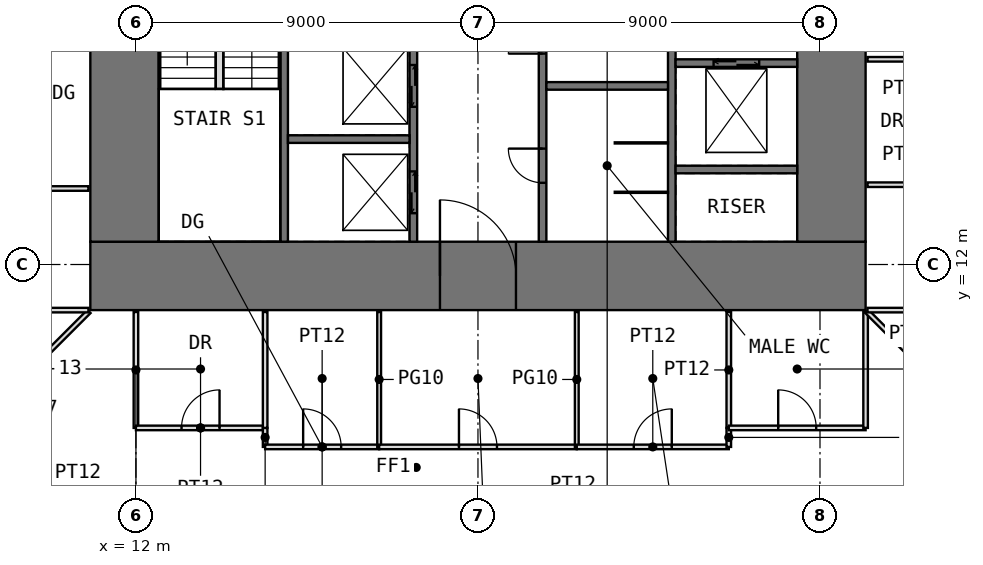
"""IFC4 building model, lengths in metres.
Left out: names, types, materials, properties, quantities, classifications, styles, units other than length and angle.
Written with IfcOpenShell. Run it as: python <this file> out.ifc"""

import sys

from ifc_helpers import new_model, si_unit, direction, frame, frame_2d, origin, place, context, subcontext, project, spatial, rectangle, extrude, element, fill, save


model = new_model("IFC4")
c1 = context("Model", 3, precision=1e-05, world=origin(), true_north=direction((0.0, 1.0)))
c2 = subcontext(c1, "Body", "Model", "MODEL_VIEW")
j1 = project(units=[si_unit("LENGTHUNIT", "METRE"), si_unit("PLANEANGLEUNIT", "RADIAN")], contexts=[c1])
p1 = place(None, origin())
s1 = spatial("IfcSite", under=j1, at=p1, CompositionType="ELEMENT")
p2 = place(p1, origin())
s2 = spatial("IfcBuilding", under=s1, at=p2, CompositionType="ELEMENT")
p3 = place(p2, frame((0.0, 0.0, 54.5)))
s3 = spatial("IfcBuildingStorey", under=s2, at=p3, CompositionType="ELEMENT", Elevation=54.5)
p4 = place(p3, frame((10.8, 11.7, -0.05), z_axis=(0.0, 0.0, 1.0), x_axis=(1.0, 0.0, 0.0)))
e1 = element("IfcWall", 1, at=p4, inside=s3, PredefinedType="SHEAR", context=c2, shape_type="SweptSolid", body=[
    extrude(rectangle(XDim=20.4, YDim=1.8, at=frame_2d((10.2, 0.0))), origin(), (0.0, 0.0, 1.0), 4.0),
])
p5 = place(p4, frame((9.2, 0.0, 0.05)))
e2 = element("IfcOpeningElement", 2, at=p5, cuts=e1, PredefinedType="OPENING", context=c2, shape_type="SweptSolid", body=[
    extrude(rectangle(XDim=2.0, YDim=2.2, at=frame_2d((1.0, 1.1))), frame((0.0, 0.91, 0.0), z_axis=(0.0, -1.0, 0.0), x_axis=(1.0, 0.0, 0.0)), (0.0, 0.0, 1.0), 1.82),
])
p6 = place(p3, frame((11.7, 12.6, -0.05), z_axis=(0.0, 0.0, 1.0), x_axis=(0.0, 1.0, 0.0)))
e3 = element("IfcWall", 3, at=p6, inside=s3, PredefinedType="SHEAR", context=c2, shape_type="SweptSolid", body=[
    extrude(rectangle(XDim=16.8, YDim=1.8, at=frame_2d((8.4, 0.0))), origin(), (0.0, 0.0, 1.0), 4.0),
])
p7 = place(p6, frame((9.9, 0.0, 0.05)))
e4 = element("IfcOpeningElement", 4, at=p7, cuts=e3, PredefinedType="OPENING", context=c2, shape_type="SweptSolid", body=[
    extrude(rectangle(XDim=1.0, YDim=2.2, at=frame_2d((0.5, 1.1))), frame((0.0, 0.91, 0.0), z_axis=(0.0, -1.0, 0.0), x_axis=(1.0, 0.0, 0.0)), (0.0, 0.0, 1.0), 1.82),
])
p8 = place(p3, frame((30.3, 12.6, -0.05), z_axis=(0.0, 0.0, 1.0), x_axis=(0.0, 1.0, 0.0)))
e5 = element("IfcWall", 5, at=p8, inside=s3, PredefinedType="SHEAR", context=c2, shape_type="SweptSolid", body=[
    extrude(rectangle(XDim=16.8, YDim=1.8, at=frame_2d((8.4, 0.0))), origin(), (0.0, 0.0, 1.0), 4.0),
])
p9 = place(p8, frame((5.9, 0.0, 0.05)))
e6 = element("IfcOpeningElement", 6, at=p9, cuts=e5, PredefinedType="OPENING", context=c2, shape_type="SweptSolid", body=[
    extrude(rectangle(XDim=1.0, YDim=2.2, at=frame_2d((0.5, 1.1))), frame((0.0, 0.91, 0.0), z_axis=(0.0, -1.0, 0.0), x_axis=(1.0, 0.0, 0.0)), (0.0, 0.0, 1.0), 1.82),
])
p10 = place(p3, frame((15.9, 12.6, -0.05), z_axis=(0.0, 0.0, 1.0), x_axis=(0.0, 1.0, 0.0)))
e7 = element("IfcWall", 7, at=p10, inside=s3, PredefinedType="SHEAR", context=c2, shape_type="SweptSolid", body=[
    extrude(rectangle(XDim=16.8, YDim=0.2, at=frame_2d((8.4, 0.0))), origin(), (0.0, 0.0, 1.0), 4.0),
])
p11 = place(p10, frame((8.9, 0.0, 0.05)))
e8 = element("IfcOpeningElement", 8, at=p11, cuts=e7, PredefinedType="OPENING", context=c2, shape_type="SweptSolid", body=[
    extrude(rectangle(XDim=1.0, YDim=2.2, at=frame_2d((0.5, 1.1))), frame((0.0, 0.11, 0.0), z_axis=(0.0, -1.0, 0.0), x_axis=(1.0, 0.0, 0.0)), (0.0, 0.0, 1.0), 0.22),
])
p12 = place(p3, frame((19.3, 12.6, -0.05), z_axis=(0.0, 0.0, 1.0), x_axis=(0.0, 1.0, 0.0)))
e9 = element("IfcWall", 9, at=p12, inside=s3, PredefinedType="SHEAR", context=c2, shape_type="SweptSolid", body=[
    extrude(rectangle(XDim=16.8, YDim=0.2, at=frame_2d((8.4, 0.0))), origin(), (0.0, 0.0, 1.0), 4.0),
])
p13 = place(p12, frame((8.7, 0.0, 0.05)))
e10 = element("IfcOpeningElement", 10, at=p13, cuts=e9, PredefinedType="OPENING", context=c2, shape_type="SweptSolid", body=[
    extrude(rectangle(XDim=1.0, YDim=2.2, at=frame_2d((0.5, 1.1))), frame((0.0, 0.11, 0.0), z_axis=(0.0, -1.0, 0.0), x_axis=(1.0, 0.0, 0.0)), (0.0, 0.0, 1.0), 0.22),
])
p14 = place(p12, frame((10.85, 0.0, 0.05)))
e11 = element("IfcOpeningElement", 11, at=p14, cuts=e9, PredefinedType="OPENING", context=c2, shape_type="SweptSolid", body=[
    extrude(rectangle(XDim=0.9, YDim=2.2, at=frame_2d((0.45, 1.1))), frame((0.0, 0.11, 0.0), z_axis=(0.0, -1.0, 0.0), x_axis=(1.0, 0.0, 0.0)), (0.0, 0.0, 1.0), 0.22),
])
p15 = place(p12, frame((13.3, 0.0, 0.05)))
e12 = element("IfcOpeningElement", 12, at=p15, cuts=e9, PredefinedType="OPENING", context=c2, shape_type="SweptSolid", body=[
    extrude(rectangle(XDim=1.0, YDim=2.2, at=frame_2d((0.5, 1.1))), frame((0.0, 0.11, 0.0), z_axis=(0.0, -1.0, 0.0), x_axis=(1.0, 0.0, 0.0)), (0.0, 0.0, 1.0), 0.22),
])
p16 = place(p12, frame((15.55, 0.0, 0.05)))
e13 = element("IfcOpeningElement", 13, at=p16, cuts=e9, PredefinedType="OPENING", context=c2, shape_type="SweptSolid", body=[
    extrude(rectangle(XDim=0.9, YDim=2.2, at=frame_2d((0.45, 1.1))), frame((0.0, 0.11, 0.0), z_axis=(0.0, -1.0, 0.0), x_axis=(1.0, 0.0, 0.0)), (0.0, 0.0, 1.0), 0.22),
])
p17 = place(p12, frame((0.75, 0.0, 0.05)))
e14 = element("IfcOpeningElement", 14, at=p17, cuts=e9, PredefinedType="OPENING", context=c2, shape_type="SweptSolid", body=[
    extrude(rectangle(XDim=1.1, YDim=2.2, at=frame_2d((0.55, 1.1))), frame((0.0, 0.11, 0.0), z_axis=(0.0, -1.0, 0.0), x_axis=(1.0, 0.0, 0.0)), (0.0, 0.0, 1.0), 0.22),
])
p18 = place(p12, frame((3.55, 0.0, 0.05)))
e15 = element("IfcOpeningElement", 15, at=p18, cuts=e9, PredefinedType="OPENING", context=c2, shape_type="SweptSolid", body=[
    extrude(rectangle(XDim=1.1, YDim=2.2, at=frame_2d((0.55, 1.1))), frame((0.0, 0.11, 0.0), z_axis=(0.0, -1.0, 0.0), x_axis=(1.0, 0.0, 0.0)), (0.0, 0.0, 1.0), 0.22),
])
p19 = place(p12, frame((6.35, 0.0, 0.05)))
e16 = element("IfcOpeningElement", 16, at=p19, cuts=e9, PredefinedType="OPENING", context=c2, shape_type="SweptSolid", body=[
    extrude(rectangle(XDim=1.1, YDim=2.2, at=frame_2d((0.55, 1.1))), frame((0.0, 0.11, 0.0), z_axis=(0.0, -1.0, 0.0), x_axis=(1.0, 0.0, 0.0)), (0.0, 0.0, 1.0), 0.22),
])
p20 = place(p3, frame((22.7, 12.6, -0.05), z_axis=(0.0, 0.0, 1.0), x_axis=(0.0, 1.0, 0.0)))
e17 = element("IfcWall", 17, at=p20, inside=s3, PredefinedType="SHEAR", context=c2, shape_type="SweptSolid", body=[
    extrude(rectangle(XDim=16.8, YDim=0.2, at=frame_2d((8.4, 0.0))), origin(), (0.0, 0.0, 1.0), 4.0),
])
p21 = place(p20, frame((7.1, 0.0, 0.05)))
e18 = element("IfcOpeningElement", 18, at=p21, cuts=e17, PredefinedType="OPENING", context=c2, shape_type="SweptSolid", body=[
    extrude(rectangle(XDim=1.0, YDim=2.2, at=frame_2d((0.5, 1.1))), frame((0.0, 0.11, 0.0), z_axis=(0.0, -1.0, 0.0), x_axis=(1.0, 0.0, 0.0)), (0.0, 0.0, 1.0), 0.22),
])
p22 = place(p20, frame((1.55, 0.0, 0.05)))
e19 = element("IfcOpeningElement", 19, at=p22, cuts=e17, PredefinedType="OPENING", context=c2, shape_type="SweptSolid", body=[
    extrude(rectangle(XDim=0.9, YDim=2.2, at=frame_2d((0.45, 1.1))), frame((0.0, 0.11, 0.0), z_axis=(0.0, -1.0, 0.0), x_axis=(1.0, 0.0, 0.0)), (0.0, 0.0, 1.0), 0.22),
])
p23 = place(p20, frame((4.95, 0.0, 0.05)))
e20 = element("IfcOpeningElement", 20, at=p23, cuts=e17, PredefinedType="OPENING", context=c2, shape_type="SweptSolid", body=[
    extrude(rectangle(XDim=0.9, YDim=2.2, at=frame_2d((0.45, 1.1))), frame((0.0, 0.11, 0.0), z_axis=(0.0, -1.0, 0.0), x_axis=(1.0, 0.0, 0.0)), (0.0, 0.0, 1.0), 0.22),
])
p24 = place(p3, frame((26.1, 12.6, -0.05), z_axis=(0.0, 0.0, 1.0), x_axis=(0.0, 1.0, 0.0)))
e21 = element("IfcWall", 21, at=p24, inside=s3, PredefinedType="SHEAR", context=c2, shape_type="SweptSolid", body=[
    extrude(rectangle(XDim=16.8, YDim=0.2, at=frame_2d((8.4, 0.0))), origin(), (0.0, 0.0, 1.0), 4.0),
])
p25 = place(p24, frame((6.9, 0.0, 0.05)))
e22 = element("IfcOpeningElement", 22, at=p25, cuts=e21, PredefinedType="OPENING", context=c2, shape_type="SweptSolid", body=[
    extrude(rectangle(XDim=1.0, YDim=2.2, at=frame_2d((0.5, 1.1))), frame((0.0, 0.11, 0.0), z_axis=(0.0, -1.0, 0.0), x_axis=(1.0, 0.0, 0.0)), (0.0, 0.0, 1.0), 0.22),
])
for number, where, z_axis, x_axis in (
    (23, (16.0, 15.3, -0.05), (0.0, 0.0, 1.0), (1.0, 0.0, 0.0)),
    (24, (22.8, 16.7, -0.05), (0.0, 0.0, 1.0), (1.0, 0.0, 0.0)),
    (25, (26.2, 14.5, -0.05), (0.0, 0.0, 1.0), (1.0, 0.0, 0.0)),
):
    element("IfcWall", number, at=place(p3, frame(where, z_axis=z_axis, x_axis=x_axis)), inside=s3, PredefinedType="SHEAR", context=c2, shape_type="SweptSolid", body=[
        extrude(rectangle(XDim=3.2, YDim=0.2, at=frame_2d((1.6, 0.0))), origin(), (0.0, 0.0, 1.0), 4.0),
    ])
p26 = place(p3, frame((26.2, 17.3, -0.05), z_axis=(0.0, 0.0, 1.0), x_axis=(1.0, 0.0, 0.0)))
e26 = element("IfcWall", 26, at=p26, inside=s3, PredefinedType="SHEAR", context=c2, shape_type="SweptSolid", body=[
    extrude(rectangle(XDim=3.2, YDim=0.2, at=frame_2d((1.6, 0.0))), origin(), (0.0, 0.0, 1.0), 4.0),
])
p27 = place(p26, frame((1.0, 0.0, 0.05)))
e27 = element("IfcOpeningElement", 27, at=p27, cuts=e26, PredefinedType="OPENING", context=c2, shape_type="SweptSolid", body=[
    extrude(rectangle(XDim=1.2, YDim=2.2, at=frame_2d((0.6, 1.1))), frame((0.0, 0.11, 0.0), z_axis=(0.0, -1.0, 0.0), x_axis=(1.0, 0.0, 0.0)), (0.0, 0.0, 1.0), 0.22),
])
for number, where, z_axis, x_axis in (
    (28, (24.6, 13.9, 0.0), (0.0, 0.0, 1.0), (1.0, 0.0, 0.0)),
    (29, (24.6, 15.2, 0.0), (0.0, 0.0, 1.0), (1.0, 0.0, 0.0)),
):
    element("IfcWall", number, at=place(p3, frame(where, z_axis=z_axis, x_axis=x_axis)), inside=s3, PredefinedType="PARTITIONING", context=c2, shape_type="SweptSolid", body=[
        extrude(rectangle(XDim=1.4, YDim=0.03, at=frame_2d((0.7, 0.0))), origin(), (0.0, 0.0, 1.0), 3.75),
    ])
p28 = place(p3, frame((7.11, 7.11, 0.0), z_axis=(0.0, 0.0, 1.0), x_axis=(0.707106781187, 0.707106781187, 0.0)))
e30 = element("IfcWall", 30, at=p28, inside=s3, PredefinedType="PARTITIONING", context=c2, shape_type="SweptSolid", body=[
    extrude(rectangle(XDim=5.168, YDim=0.12, at=frame_2d((2.584, 0.0))), origin(), (0.0, 0.0, 1.0), 3.75),
])
for number, where, z_axis, x_axis in (
    (31, (7.2, 10.8, 0.0), (0.0, 0.0, 1.0), (1.0, 0.0, 0.0)),
    (32, (7.2, 14.0, 0.0), (0.0, 0.0, 1.0), (1.0, 0.0, 0.0)),
):
    element("IfcWall", number, at=place(p3, frame(where, z_axis=z_axis, x_axis=x_axis)), inside=s3, PredefinedType="PARTITIONING", context=c2, shape_type="SweptSolid", body=[
        extrude(rectangle(XDim=3.55, YDim=0.12, at=frame_2d((1.775, 0.0))), origin(), (0.0, 0.0, 1.0), 3.75),
    ])
p29 = place(p3, frame((12.0, 7.7, 0.0), z_axis=(0.0, 0.0, 1.0), x_axis=(0.0, 1.0, 0.0)))
e33 = element("IfcWall", 33, at=p29, inside=s3, PredefinedType="PARTITIONING", context=c2, shape_type="SweptSolid", body=[
    extrude(rectangle(XDim=3.05, YDim=0.12, at=frame_2d((1.525, 0.0))), origin(), (0.0, 0.0, 1.0), 3.75),
])
p30 = place(p3, frame((12.0, 7.7, 0.0), z_axis=(0.0, 0.0, 1.0), x_axis=(1.0, 0.0, 0.0)))
e34 = element("IfcWall", 34, at=p30, inside=s3, PredefinedType="PARTITIONING", context=c2, shape_type="SweptSolid", body=[
    extrude(rectangle(XDim=3.4, YDim=0.12, at=frame_2d((1.7, 0.0))), origin(), (0.0, 0.0, 1.0), 3.75),
])
p31 = place(p30, frame((1.2, 0.0, 0.0)))
e35 = element("IfcOpeningElement", 35, at=p31, cuts=e34, PredefinedType="OPENING", context=c2, shape_type="SweptSolid", body=[
    extrude(rectangle(XDim=1.0, YDim=2.2, at=frame_2d((0.5, 1.1))), frame((0.0, 0.07, 0.0), z_axis=(0.0, -1.0, 0.0), x_axis=(1.0, 0.0, 0.0)), (0.0, 0.0, 1.0), 0.14),
])
p32 = place(p3, frame((15.4, 7.2, 0.0), z_axis=(0.0, 0.0, 1.0), x_axis=(0.0, 1.0, 0.0)))
e36 = element("IfcWall", 36, at=p32, inside=s3, PredefinedType="PARTITIONING", context=c2, shape_type="SweptSolid", body=[
    extrude(rectangle(XDim=0.5, YDim=0.12, at=frame_2d((0.25, 0.0))), origin(), (0.0, 0.0, 1.0), 3.75),
])
p33 = place(p3, frame((15.4, 7.2, 0.0), z_axis=(0.0, 0.0, 1.0), x_axis=(1.0, 0.0, 0.0)))
e37 = element("IfcWall", 37, at=p33, inside=s3, PredefinedType="PARTITIONING", context=c2, shape_type="SweptSolid", body=[
    extrude(rectangle(XDim=3.0, YDim=0.12, at=frame_2d((1.5, 0.0))), origin(), (0.0, 0.0, 1.0), 3.75),
])
p34 = place(p33, frame((1.0, 0.0, 0.0)))
e38 = element("IfcOpeningElement", 38, at=p34, cuts=e37, PredefinedType="OPENING", context=c2, shape_type="SweptSolid", body=[
    extrude(rectangle(XDim=1.0, YDim=2.4, at=frame_2d((0.5, 1.2))), frame((0.0, 0.07, 0.0), z_axis=(0.0, -1.0, 0.0), x_axis=(1.0, 0.0, 0.0)), (0.0, 0.0, 1.0), 0.14),
])
p35 = place(p3, frame((15.4, 7.7, 0.0), z_axis=(0.0, 0.0, 1.0), x_axis=(0.0, 1.0, 0.0)))
e39 = element("IfcWall", 39, at=p35, inside=s3, PredefinedType="PARTITIONING", context=c2, shape_type="SweptSolid", body=[
    extrude(rectangle(XDim=3.05, YDim=0.12, at=frame_2d((1.525, 0.0))), origin(), (0.0, 0.0, 1.0), 3.75),
])
p36 = place(p3, frame((18.4, 7.2, 0.0), z_axis=(0.0, 0.0, 1.0), x_axis=(0.0, 1.0, 0.0)))
e40 = element("IfcWall", 40, at=p36, inside=s3, PredefinedType="PARTITIONING", context=c2, shape_type="SweptSolid", body=[
    extrude(rectangle(XDim=3.55, YDim=0.1, at=frame_2d((1.775, 0.0))), origin(), (0.0, 0.0, 1.0), 3.75),
])
p37 = place(p3, frame((18.4, 7.2, 0.0), z_axis=(0.0, 0.0, 1.0), x_axis=(1.0, 0.0, 0.0)))
e41 = element("IfcWall", 41, at=p37, inside=s3, PredefinedType="PARTITIONING", context=c2, shape_type="SweptSolid", body=[
    extrude(rectangle(XDim=5.2, YDim=0.12, at=frame_2d((2.6, 0.0))), origin(), (0.0, 0.0, 1.0), 3.75),
])
p38 = place(p37, frame((2.1, 0.0, 0.0)))
e42 = element("IfcOpeningElement", 42, at=p38, cuts=e41, PredefinedType="OPENING", context=c2, shape_type="SweptSolid", body=[
    extrude(rectangle(XDim=1.0, YDim=2.4, at=frame_2d((0.5, 1.2))), frame((0.0, 0.07, 0.0), z_axis=(0.0, -1.0, 0.0), x_axis=(1.0, 0.0, 0.0)), (0.0, 0.0, 1.0), 0.14),
])
p39 = place(p3, frame((23.6, 7.2, 0.0), z_axis=(0.0, 0.0, 1.0), x_axis=(0.0, 1.0, 0.0)))
e43 = element("IfcWall", 43, at=p39, inside=s3, PredefinedType="PARTITIONING", context=c2, shape_type="SweptSolid", body=[
    extrude(rectangle(XDim=3.55, YDim=0.1, at=frame_2d((1.775, 0.0))), origin(), (0.0, 0.0, 1.0), 3.75),
])
p40 = place(p3, frame((23.6, 7.2, 0.0), z_axis=(0.0, 0.0, 1.0), x_axis=(1.0, 0.0, 0.0)))
e44 = element("IfcWall", 44, at=p40, inside=s3, PredefinedType="PARTITIONING", context=c2, shape_type="SweptSolid", body=[
    extrude(rectangle(XDim=4.0, YDim=0.12, at=frame_2d((2.0, 0.0))), origin(), (0.0, 0.0, 1.0), 3.75),
])
p41 = place(p40, frame((1.5, 0.0, 0.0)))
e45 = element("IfcOpeningElement", 45, at=p41, cuts=e44, PredefinedType="OPENING", context=c2, shape_type="SweptSolid", body=[
    extrude(rectangle(XDim=1.0, YDim=2.4, at=frame_2d((0.5, 1.2))), frame((0.0, 0.07, 0.0), z_axis=(0.0, -1.0, 0.0), x_axis=(1.0, 0.0, 0.0)), (0.0, 0.0, 1.0), 0.14),
])
p42 = place(p3, frame((27.6, 7.2, 0.0), z_axis=(0.0, 0.0, 1.0), x_axis=(0.0, 1.0, 0.0)))
e46 = element("IfcWall", 46, at=p42, inside=s3, PredefinedType="PARTITIONING", context=c2, shape_type="SweptSolid", body=[
    extrude(rectangle(XDim=0.5, YDim=0.12, at=frame_2d((0.25, 0.0))), origin(), (0.0, 0.0, 1.0), 3.75),
])
p43 = place(p3, frame((27.6, 7.7, 0.0), z_axis=(0.0, 0.0, 1.0), x_axis=(0.0, 1.0, 0.0)))
e47 = element("IfcWall", 47, at=p43, inside=s3, PredefinedType="PARTITIONING", context=c2, shape_type="SweptSolid", body=[
    extrude(rectangle(XDim=3.05, YDim=0.12, at=frame_2d((1.525, 0.0))), origin(), (0.0, 0.0, 1.0), 3.75),
])
p44 = place(p3, frame((27.6, 7.7, 0.0), z_axis=(0.0, 0.0, 1.0), x_axis=(1.0, 0.0, 0.0)))
e48 = element("IfcWall", 48, at=p44, inside=s3, PredefinedType="PARTITIONING", context=c2, shape_type="SweptSolid", body=[
    extrude(rectangle(XDim=3.6, YDim=0.12, at=frame_2d((1.8, 0.0))), origin(), (0.0, 0.0, 1.0), 3.75),
])
p45 = place(p44, frame((1.3, 0.0, 0.0)))
e49 = element("IfcOpeningElement", 49, at=p45, cuts=e48, PredefinedType="OPENING", context=c2, shape_type="SweptSolid", body=[
    extrude(rectangle(XDim=1.0, YDim=2.2, at=frame_2d((0.5, 1.1))), frame((0.0, 0.07, 0.0), z_axis=(0.0, -1.0, 0.0), x_axis=(1.0, 0.0, 0.0)), (0.0, 0.0, 1.0), 0.14),
])
p46 = place(p3, frame((31.2, 7.7, 0.0), z_axis=(0.0, 0.0, 1.0), x_axis=(0.0, 1.0, 0.0)))
e50 = element("IfcWall", 50, at=p46, inside=s3, PredefinedType="PARTITIONING", context=c2, shape_type="SweptSolid", body=[
    extrude(rectangle(XDim=3.05, YDim=0.12, at=frame_2d((1.525, 0.0))), origin(), (0.0, 0.0, 1.0), 3.75),
])
p47 = place(p3, frame((31.235, 10.765, 0.0), z_axis=(0.0, 0.0, 1.0), x_axis=(0.707106781187, -0.707106781187, 0.0)))
e51 = element("IfcWall", 51, at=p47, inside=s3, PredefinedType="PARTITIONING", context=c2, shape_type="SweptSolid", body=[
    extrude(rectangle(XDim=3.346, YDim=0.12, at=frame_2d((1.673, 0.0))), origin(), (0.0, 0.0, 1.0), 3.75),
])
for number, where, z_axis, x_axis in (
    (52, (31.25, 10.8, 0.0), (0.0, 0.0, 1.0), (1.0, 0.0, 0.0)),
    (53, (31.25, 14.1, 0.0), (0.0, 0.0, 1.0), (1.0, 0.0, 0.0)),
    (54, (31.25, 17.4, 0.0), (0.0, 0.0, 1.0), (1.0, 0.0, 0.0)),
):
    element("IfcWall", number, at=place(p3, frame(where, z_axis=z_axis, x_axis=x_axis)), inside=s3, PredefinedType="PARTITIONING", context=c2, shape_type="SweptSolid", body=[
        extrude(rectangle(XDim=3.55, YDim=0.12, at=frame_2d((1.775, 0.0))), origin(), (0.0, 0.0, 1.0), 3.75),
    ])
p48 = place(p3, frame((14.2, 16.62, 0.0), z_axis=(0.0, 0.0, 1.0), x_axis=(0.0, 1.0, 0.0)))
e55 = element("IfcWall", 55, at=p48, inside=s3, PredefinedType="PARTITIONING", context=c2, shape_type="SweptSolid", body=[
    extrude(rectangle(XDim=3.08, YDim=0.2, at=frame_2d((1.54, 0.0))), origin(), (0.0, 0.0, 1.0), 4.0),
])
p49 = place(p5, origin())
e56 = element("IfcDoor", 56, at=p49, inside=s3, OperationType="DOUBLE_DOOR_SINGLE_SWING", PredefinedType="DOOR", context=c2, shape_type="SweptSolid", body=[
    extrude(rectangle(XDim=2.0, YDim=2.2, at=frame_2d((1.0, 1.1))), frame((0.0, 0.025, 0.0), z_axis=(0.0, -1.0, 0.0), x_axis=(1.0, 0.0, 0.0)), (0.0, 0.0, 1.0), 0.05),
])
fill(e2, e56)
p50 = place(p22, origin())
e57 = element("IfcDoor", 57, at=p50, inside=s3, OperationType="SINGLE_SWING_RIGHT", PredefinedType="DOOR", context=c2, shape_type="SweptSolid", body=[
    extrude(rectangle(XDim=0.9, YDim=2.2, at=frame_2d((0.45, 1.1))), frame((0.0, 0.025, 0.0), z_axis=(0.0, -1.0, 0.0), x_axis=(1.0, 0.0, 0.0)), (0.0, 0.0, 1.0), 0.05),
])
fill(e19, e57)
p51 = place(p23, origin())
e58 = element("IfcDoor", 58, at=p51, inside=s3, OperationType="SINGLE_SWING_LEFT", PredefinedType="DOOR", context=c2, shape_type="SweptSolid", body=[
    extrude(rectangle(XDim=0.9, YDim=2.2, at=frame_2d((0.45, 1.1))), frame((0.0, 0.025, 0.0), z_axis=(0.0, -1.0, 0.0), x_axis=(1.0, 0.0, 0.0)), (0.0, 0.0, 1.0), 0.05),
])
fill(e20, e58)
p52 = place(p31, origin())
e59 = element("IfcDoor", 59, at=p52, inside=s3, OperationType="SINGLE_SWING_RIGHT", PredefinedType="DOOR", context=c2, shape_type="SweptSolid", body=[
    extrude(rectangle(XDim=1.0, YDim=2.2, at=frame_2d((0.5, 1.1))), frame((0.0, 0.025, 0.0), z_axis=(0.0, -1.0, 0.0), x_axis=(1.0, 0.0, 0.0)), (0.0, 0.0, 1.0), 0.05),
])
fill(e35, e59)
p53 = place(p34, origin())
e60 = element("IfcDoor", 60, at=p53, inside=s3, OperationType="SINGLE_SWING_LEFT", PredefinedType="DOOR", context=c2, shape_type="SweptSolid", body=[
    extrude(rectangle(XDim=1.0, YDim=2.4, at=frame_2d((0.5, 1.2))), frame((0.0, 0.025, 0.0), z_axis=(0.0, -1.0, 0.0), x_axis=(1.0, 0.0, 0.0)), (0.0, 0.0, 1.0), 0.05),
])
fill(e38, e60)
p54 = place(p41, origin())
e61 = element("IfcDoor", 61, at=p54, inside=s3, OperationType="SINGLE_SWING_RIGHT", PredefinedType="DOOR", context=c2, shape_type="SweptSolid", body=[
    extrude(rectangle(XDim=1.0, YDim=2.4, at=frame_2d((0.5, 1.2))), frame((0.0, 0.025, 0.0), z_axis=(0.0, -1.0, 0.0), x_axis=(1.0, 0.0, 0.0)), (0.0, 0.0, 1.0), 0.05),
])
fill(e45, e61)
p55 = place(p45, origin())
e62 = element("IfcDoor", 62, at=p55, inside=s3, OperationType="SINGLE_SWING_LEFT", PredefinedType="DOOR", context=c2, shape_type="SweptSolid", body=[
    extrude(rectangle(XDim=1.0, YDim=2.2, at=frame_2d((0.5, 1.1))), frame((0.0, 0.025, 0.0), z_axis=(0.0, -1.0, 0.0), x_axis=(1.0, 0.0, 0.0)), (0.0, 0.0, 1.0), 0.05),
])
fill(e49, e62)
p56 = place(p38, origin())
e63 = element("IfcDoor", 63, at=p56, inside=s3, OperationType="SINGLE_SWING_LEFT", PredefinedType="DOOR", context=c2, shape_type="SweptSolid", body=[
    extrude(rectangle(XDim=1.0, YDim=2.4, at=frame_2d((0.5, 1.2))), frame((0.0, 0.025, 0.0), z_axis=(0.0, -1.0, 0.0), x_axis=(1.0, 0.0, 0.0)), (0.0, 0.0, 1.0), 0.05),
])
fill(e42, e63)
p57 = place(p17, origin())
e64 = element("IfcDoor", 64, at=p57, inside=s3, OperationType="DOUBLE_DOOR_SLIDING", PredefinedType="DOOR", context=c2, shape_type="SweptSolid", body=[
    extrude(rectangle(XDim=1.1, YDim=2.2, at=frame_2d((0.55, 1.1))), frame((0.0, 0.025, 0.0), z_axis=(0.0, -1.0, 0.0), x_axis=(1.0, 0.0, 0.0)), (0.0, 0.0, 1.0), 0.05),
])
fill(e14, e64)
p58 = place(p18, origin())
e65 = element("IfcDoor", 65, at=p58, inside=s3, OperationType="DOUBLE_DOOR_SLIDING", PredefinedType="DOOR", context=c2, shape_type="SweptSolid", body=[
    extrude(rectangle(XDim=1.1, YDim=2.2, at=frame_2d((0.55, 1.1))), frame((0.0, 0.025, 0.0), z_axis=(0.0, -1.0, 0.0), x_axis=(1.0, 0.0, 0.0)), (0.0, 0.0, 1.0), 0.05),
])
fill(e15, e65)
p59 = place(p27, origin())
e66 = element("IfcDoor", 66, at=p59, inside=s3, OperationType="DOUBLE_DOOR_SLIDING", PredefinedType="DOOR", context=c2, shape_type="SweptSolid", body=[
    extrude(rectangle(XDim=1.2, YDim=2.2, at=frame_2d((0.6, 1.1))), frame((0.0, 0.025, 0.0), z_axis=(0.0, -1.0, 0.0), x_axis=(1.0, 0.0, 0.0)), (0.0, 0.0, 1.0), 0.05),
])
fill(e27, e66)
save(model, sys.argv[1])
